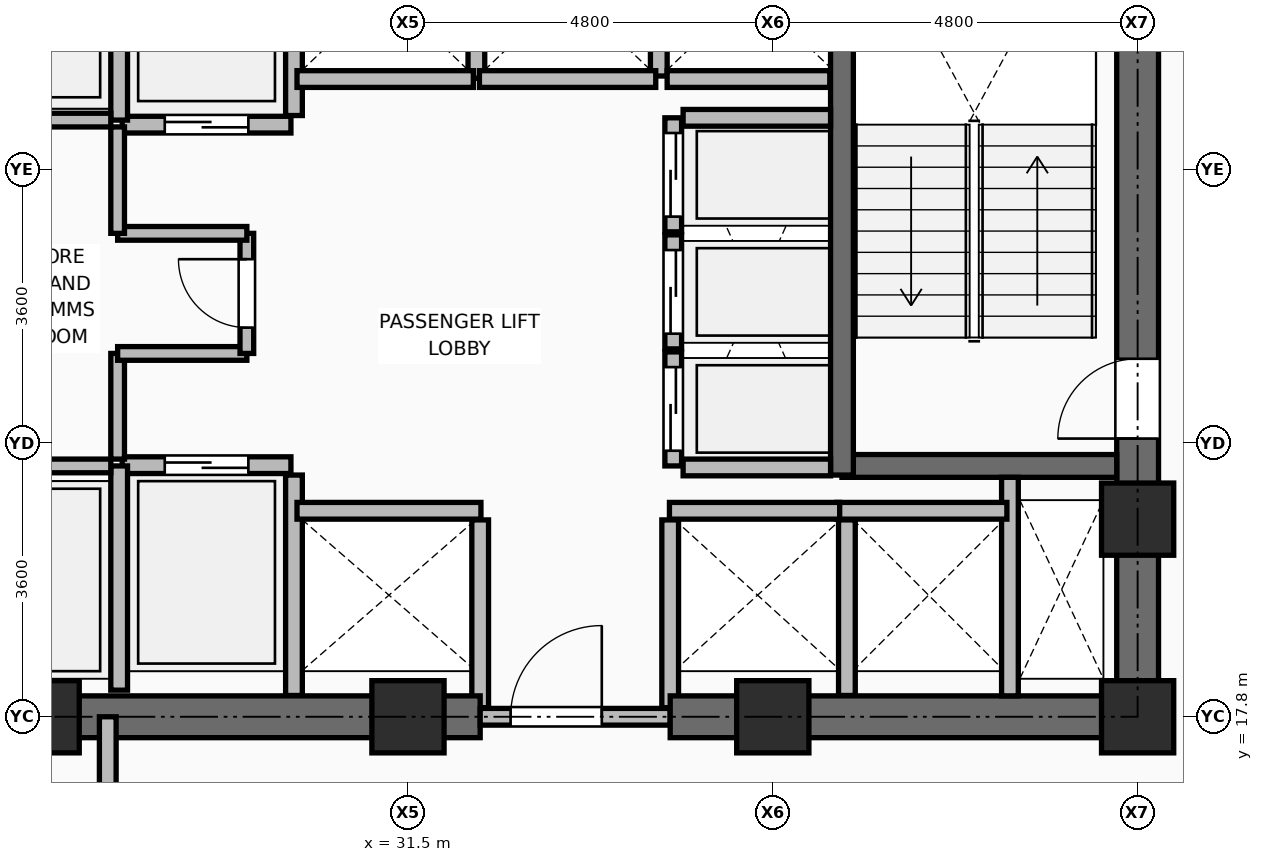
"""IFC4 building model, lengths in metres.
Left out: names, types, materials, properties, quantities, classifications, styles, units other than length and angle.
Written with IfcOpenShell. Run it as: python <this file> out.ifc"""

import sys

from ifc_helpers import new_model, si_unit, direction, frame, frame_2d, origin, origin_2d, place, context, subcontext, project, spatial, rectangle, extrude, element, fill, save


model = new_model("IFC4")
c1 = context("Model", 3, precision=1e-05, world=origin(), true_north=direction((0.0, 1.0)))
c2 = subcontext(c1, "Body", "Model", "MODEL_VIEW")
j1 = project(units=[si_unit("LENGTHUNIT", "METRE"), si_unit("PLANEANGLEUNIT", "RADIAN")], contexts=[c1])
p1 = place(None, origin())
s1 = spatial("IfcSite", under=j1, at=p1, CompositionType="ELEMENT")
p2 = place(p1, origin())
s2 = spatial("IfcBuilding", under=s1, at=p2, CompositionType="ELEMENT")
p3 = place(p2, frame((0.0, 0.0, 172.2)))
s3 = spatial("IfcBuildingStorey", under=s2, at=p3, CompositionType="ELEMENT", Elevation=172.2)
for number, where, z_axis, x_axis in (
    (1, (26.7, 17.8, 0.0), (0.0, 0.0, 1.0), (1.0, 0.0, 0.0)),
    (2, (31.5, 17.8, 0.0), (0.0, 0.0, 1.0), (1.0, 0.0, 0.0)),
    (3, (36.3, 17.8, 0.0), (0.0, 0.0, 1.0), (1.0, 0.0, 0.0)),
    (4, (41.1, 17.8, 0.0), (0.0, 0.0, 1.0), (1.0, 0.0, 0.0)),
    (5, (41.1, 20.4, 0.0), (0.0, 0.0, 1.0), (1.0, 0.0, 0.0)),
):
    element("IfcColumn", number, at=place(p3, frame(where, z_axis=z_axis, x_axis=x_axis)), inside=s3, PredefinedType="COLUMN", context=c2, shape_type="SweptSolid", body=[
        extrude(rectangle(XDim=0.95, YDim=0.95, at=origin_2d()), origin(), (0.0, 0.0, 1.0), 3.75),
    ])
p4 = place(p3, frame((30.0, 18.08, 0.0), z_axis=(0.0, 0.0, 1.0), x_axis=(0.0, 1.0, 0.0)))
e6 = element("IfcWall", 6, at=p4, inside=s3, PredefinedType="PARTITIONING", context=c2, shape_type="SweptSolid", body=[
    extrude(rectangle(XDim=2.9, YDim=0.22, at=frame_2d((1.45, 0.0))), origin(), (0.0, 0.0, 1.0), 3.475),
])
for number, where, z_axis, x_axis in (
    (7, (32.45, 17.92, 0.0), (0.0, 0.0, 1.0), (0.0, 1.0, 0.0)),
    (8, (34.95, 17.92, 0.0), (0.0, 0.0, 1.0), (0.0, 1.0, 0.0)),
):
    element("IfcWall", number, at=place(p3, frame(where, z_axis=z_axis, x_axis=x_axis)), inside=s3, PredefinedType="PARTITIONING", context=c2, shape_type="SweptSolid", body=[
        extrude(rectangle(XDim=2.47, YDim=0.22, at=frame_2d((1.235, 0.0))), origin(), (0.0, 0.0, 1.0), 2.936),
    ])
p5 = place(p3, frame((37.275, 18.08, 0.0), z_axis=(0.0, 0.0, 1.0), x_axis=(0.0, 1.0, 0.0)))
e9 = element("IfcWall", 9, at=p5, inside=s3, PredefinedType="PARTITIONING", context=c2, shape_type="SweptSolid", body=[
    extrude(rectangle(XDim=2.31, YDim=0.22, at=frame_2d((1.155, 0.0))), origin(), (0.0, 0.0, 1.0), 3.475),
])
p6 = place(p3, frame((30.0, 25.71, 0.0), z_axis=(0.0, 0.0, 1.0), x_axis=(0.0, 1.0, 0.0)))
e10 = element("IfcWall", 10, at=p6, inside=s3, PredefinedType="PARTITIONING", context=c2, shape_type="SweptSolid", body=[
    extrude(rectangle(XDim=2.73, YDim=0.22, at=frame_2d((1.365, 0.0))), origin(), (0.0, 0.0, 1.0), 3.475),
])
p7 = place(p3, frame((32.4, 26.2, 0.0), z_axis=(0.0, 0.0, 1.0), x_axis=(0.0, 1.0, 0.0)))
e11 = element("IfcWall", 11, at=p7, inside=s3, PredefinedType="PARTITIONING", context=c2, shape_type="SweptSolid", body=[
    extrude(rectangle(XDim=2.24, YDim=0.22, at=frame_2d((1.12, 0.0))), origin(), (0.0, 0.0, 1.0), 3.475),
])
p8 = place(p3, frame((34.8, 26.23, 0.0), z_axis=(0.0, 0.0, 1.0), x_axis=(0.0, 1.0, 0.0)))
e12 = element("IfcWall", 12, at=p8, inside=s3, PredefinedType="PARTITIONING", context=c2, shape_type="SweptSolid", body=[
    extrude(rectangle(XDim=2.21, YDim=0.22, at=frame_2d((1.105, 0.0))), origin(), (0.0, 0.0, 1.0), 3.475),
])
p9 = place(p3, frame((34.91, 26.19, 0.0), z_axis=(0.0, 0.0, 1.0), x_axis=(1.0, 0.0, 0.0)))
e13 = element("IfcWall", 13, at=p9, inside=s3, PredefinedType="PARTITIONING", context=c2, shape_type="SweptSolid", body=[
    extrude(rectangle(XDim=2.14, YDim=0.22, at=frame_2d((1.07, 0.0))), origin(), (0.0, 0.0, 1.0), 3.475),
])
p10 = place(p3, frame((25.55, 17.8, 0.0), z_axis=(0.0, 0.0, 1.0), x_axis=(1.0, 0.0, 0.0)))
e14 = element("IfcWall", 14, at=p10, inside=s3, PredefinedType="SHEAR", context=c2, shape_type="SweptSolid", body=[
    extrude(rectangle(XDim=6.9, YDim=0.55, at=frame_2d((3.45, 0.0))), origin(), (0.0, 0.0, 1.0), 3.5),
])
p11 = place(p3, frame((32.45, 17.8, 0.0), z_axis=(0.0, 0.0, 1.0), x_axis=(1.0, 0.0, 0.0)))
e15 = element("IfcWall", 15, at=p11, inside=s3, PredefinedType="PARTITIONING", context=c2, shape_type="SweptSolid", body=[
    extrude(rectangle(XDim=2.5, YDim=0.22, at=frame_2d((1.25, 0.0))), origin(), (0.0, 0.0, 1.0), 2.936),
])
p12 = place(p11, frame((0.4, 0.0, 0.0)))
e16 = element("IfcOpeningElement", 16, at=p12, cuts=e15, PredefinedType="OPENING", context=c2, shape_type="SweptSolid", body=[
    extrude(rectangle(XDim=1.2, YDim=2.1, at=frame_2d((0.6, 1.05))), frame((0.0, 0.12, 0.0), z_axis=(0.0, -1.0, 0.0), x_axis=(1.0, 0.0, 0.0)), (0.0, 0.0, 1.0), 0.24),
])
p13 = place(p3, frame((34.95, 17.8, 0.0), z_axis=(0.0, 0.0, 1.0), x_axis=(1.0, 0.0, 0.0)))
e17 = element("IfcWall", 17, at=p13, inside=s3, PredefinedType="SHEAR", context=c2, shape_type="SweptSolid", body=[
    extrude(rectangle(XDim=6.425, YDim=0.55, at=frame_2d((3.212, 0.0))), origin(), (0.0, 0.0, 1.0), 3.5),
])
p14 = place(p3, frame((41.1, 18.075, 0.0), z_axis=(0.0, 0.0, 1.0), x_axis=(0.0, 1.0, 0.0)))
e18 = element("IfcWall", 18, at=p14, inside=s3, PredefinedType="SHEAR", context=c2, shape_type="SweptSolid", body=[
    extrude(rectangle(XDim=14.1, YDim=0.55, at=frame_2d((7.05, 0.0))), origin(), (0.0, 0.0, 1.0), 3.5),
])
p15 = place(p14, frame((3.385, 0.0, 0.0)))
e19 = element("IfcOpeningElement", 19, at=p15, cuts=e18, PredefinedType="OPENING", context=c2, shape_type="SweptSolid", body=[
    extrude(rectangle(XDim=1.05, YDim=2.1, at=frame_2d((0.525, 1.05))), frame((0.0, 0.285, 0.0), z_axis=(0.0, -1.0, 0.0), x_axis=(1.0, 0.0, 0.0)), (0.0, 0.0, 1.0), 0.57),
])
p16 = place(p3, frame((37.21, 21.1, 0.0), z_axis=(0.0, 0.0, 1.0), x_axis=(1.0, 0.0, 0.0)))
e20 = element("IfcWall", 20, at=p16, inside=s3, PredefinedType="SHEAR", context=c2, shape_type="SweptSolid", body=[
    extrude(rectangle(XDim=3.615, YDim=0.3, at=frame_2d((1.808, 0.0))), origin(), (0.0, 0.0, 1.0), 3.5),
])
p17 = place(p3, frame((37.21, 20.98, 0.0), z_axis=(0.0, 0.0, 1.0), x_axis=(0.0, 1.0, 0.0)))
e21 = element("IfcWall", 21, at=p17, inside=s3, PredefinedType="SHEAR", context=c2, shape_type="SweptSolid", body=[
    extrude(rectangle(XDim=7.99, YDim=0.3, at=frame_2d((3.995, 0.0))), origin(), (0.0, 0.0, 1.0), 3.5),
])
p18 = place(p3, frame((39.42, 18.075, 0.0), z_axis=(0.0, 0.0, 1.0), x_axis=(0.0, 1.0, 0.0)))
e22 = element("IfcWall", 22, at=p18, inside=s3, PredefinedType="PARTITIONING", context=c2, shape_type="SweptSolid", body=[
    extrude(rectangle(XDim=2.875, YDim=0.22, at=frame_2d((1.438, 0.0))), origin(), (0.0, 0.0, 1.0), 3.48),
])
p19 = place(p3, frame((27.74, 21.11, 0.0), z_axis=(0.0, 0.0, 1.0), x_axis=(1.0, 0.0, 0.0)))
e23 = element("IfcWall", 23, at=p19, inside=s3, PredefinedType="PARTITIONING", context=c2, shape_type="SweptSolid", body=[
    extrude(rectangle(XDim=2.22, YDim=0.22, at=frame_2d((1.11, 0.0))), origin(), (0.0, 0.0, 1.0), 3.48),
])
p20 = place(p19, frame((0.56, 0.0, 0.0)))
e24 = element("IfcOpeningElement", 24, at=p20, cuts=e23, PredefinedType="OPENING", context=c2, shape_type="SweptSolid", body=[
    extrude(rectangle(XDim=1.1, YDim=2.2, at=frame_2d((0.55, 1.1))), frame((0.0, 0.12, 0.0), z_axis=(0.0, -1.0, 0.0), x_axis=(1.0, 0.0, 0.0)), (0.0, 0.0, 1.0), 0.24),
])
p21 = place(p3, frame((27.74, 25.59, 0.0), z_axis=(0.0, 0.0, 1.0), x_axis=(1.0, 0.0, 0.0)))
e25 = element("IfcWall", 25, at=p21, inside=s3, PredefinedType="PARTITIONING", context=c2, shape_type="SweptSolid", body=[
    extrude(rectangle(XDim=2.22, YDim=0.22, at=frame_2d((1.11, 0.0))), origin(), (0.0, 0.0, 1.0), 3.48),
])
p22 = place(p21, frame((0.56, 0.0, 0.0)))
e26 = element("IfcOpeningElement", 26, at=p22, cuts=e25, PredefinedType="OPENING", context=c2, shape_type="SweptSolid", body=[
    extrude(rectangle(XDim=1.1, YDim=2.2, at=frame_2d((0.55, 1.1))), frame((0.0, 0.12, 0.0), z_axis=(0.0, -1.0, 0.0), x_axis=(1.0, 0.0, 0.0)), (0.0, 0.0, 1.0), 0.24),
])
p23 = place(p3, frame((30.04, 20.51, 0.0), z_axis=(0.0, 0.0, 1.0), x_axis=(1.0, 0.0, 0.0)))
e27 = element("IfcWall", 27, at=p23, inside=s3, PredefinedType="PARTITIONING", context=c2, shape_type="SweptSolid", body=[
    extrude(rectangle(XDim=2.42, YDim=0.22, at=frame_2d((1.21, 0.0))), origin(), (0.0, 0.0, 1.0), 3.48),
])
for number, where, z_axis, x_axis in (
    (28, (37.14, 20.51, 0.0), (0.0, 0.0, 1.0), (1.0, 0.0, 0.0)),
    (29, (34.94, 20.51, 0.0), (0.0, 0.0, 1.0), (1.0, 0.0, 0.0)),
):
    element("IfcWall", number, at=place(p3, frame(where, z_axis=z_axis, x_axis=x_axis)), inside=s3, PredefinedType="PARTITIONING", context=c2, shape_type="SweptSolid", body=[
        extrude(rectangle(XDim=2.24, YDim=0.22, at=frame_2d((1.12, 0.0))), origin(), (0.0, 0.0, 1.0), 3.48),
    ])
for number, where, z_axis, x_axis in (
    (30, (30.04, 26.19, 0.0), (0.0, 0.0, 1.0), (1.0, 0.0, 0.0)),
    (31, (32.44, 26.19, 0.0), (0.0, 0.0, 1.0), (1.0, 0.0, 0.0)),
):
    element("IfcWall", number, at=place(p3, frame(where, z_axis=z_axis, x_axis=x_axis)), inside=s3, PredefinedType="PARTITIONING", context=c2, shape_type="SweptSolid", body=[
        extrude(rectangle(XDim=2.32, YDim=0.22, at=frame_2d((1.16, 0.0))), origin(), (0.0, 0.0, 1.0), 3.48),
    ])
p24 = place(p3, frame((34.99, 21.1, 0.0), z_axis=(0.0, 0.0, 1.0), x_axis=(0.0, 1.0, 0.0)))
e32 = element("IfcWall", 32, at=p24, inside=s3, PredefinedType="PARTITIONING", context=c2, shape_type="SweptSolid", body=[
    extrude(rectangle(XDim=1.5, YDim=0.22, at=frame_2d((0.75, 0.0))), origin(), (0.0, 0.0, 1.0), 3.48),
])
p25 = place(p24, frame((0.2, 0.0, 0.0)))
e33 = element("IfcOpeningElement", 33, at=p25, cuts=e32, PredefinedType="OPENING", context=c2, shape_type="SweptSolid", body=[
    extrude(rectangle(XDim=1.1, YDim=2.2, at=frame_2d((0.55, 1.1))), frame((0.0, 0.12, 0.0), z_axis=(0.0, -1.0, 0.0), x_axis=(1.0, 0.0, 0.0)), (0.0, 0.0, 1.0), 0.24),
])
p26 = place(p3, frame((34.99, 22.64, 0.0), z_axis=(0.0, 0.0, 1.0), x_axis=(0.0, 1.0, 0.0)))
e34 = element("IfcWall", 34, at=p26, inside=s3, PredefinedType="PARTITIONING", context=c2, shape_type="SweptSolid", body=[
    extrude(rectangle(XDim=1.5, YDim=0.22, at=frame_2d((0.75, 0.0))), origin(), (0.0, 0.0, 1.0), 3.48),
])
p27 = place(p26, frame((0.2, 0.0, 0.0)))
e35 = element("IfcOpeningElement", 35, at=p27, cuts=e34, PredefinedType="OPENING", context=c2, shape_type="SweptSolid", body=[
    extrude(rectangle(XDim=1.1, YDim=2.2, at=frame_2d((0.55, 1.1))), frame((0.0, 0.12, 0.0), z_axis=(0.0, -1.0, 0.0), x_axis=(1.0, 0.0, 0.0)), (0.0, 0.0, 1.0), 0.24),
])
p28 = place(p3, frame((34.99, 24.18, 0.0), z_axis=(0.0, 0.0, 1.0), x_axis=(0.0, 1.0, 0.0)))
e36 = element("IfcWall", 36, at=p28, inside=s3, PredefinedType="PARTITIONING", context=c2, shape_type="SweptSolid", body=[
    extrude(rectangle(XDim=1.5, YDim=0.22, at=frame_2d((0.75, 0.0))), origin(), (0.0, 0.0, 1.0), 3.48),
])
p29 = place(p28, frame((0.2, 0.0, 0.0)))
e37 = element("IfcOpeningElement", 37, at=p29, cuts=e36, PredefinedType="OPENING", context=c2, shape_type="SweptSolid", body=[
    extrude(rectangle(XDim=1.1, YDim=2.2, at=frame_2d((0.55, 1.1))), frame((0.0, 0.12, 0.0), z_axis=(0.0, -1.0, 0.0), x_axis=(1.0, 0.0, 0.0)), (0.0, 0.0, 1.0), 0.24),
])
p30 = place(p3, frame((27.7, 18.15, 0.0), z_axis=(0.0, 0.0, 1.0), x_axis=(0.0, 1.0, 0.0)))
e38 = element("IfcWall", 38, at=p30, inside=s3, PredefinedType="PARTITIONING", context=c2, shape_type="SweptSolid", body=[
    extrude(rectangle(XDim=2.95, YDim=0.22, at=frame_2d((1.475, 0.0))), origin(), (0.0, 0.0, 1.0), 3.48),
])
p31 = place(p3, frame((27.7, 25.65, 0.0), z_axis=(0.0, 0.0, 1.0), x_axis=(0.0, 1.0, 0.0)))
e39 = element("IfcWall", 39, at=p31, inside=s3, PredefinedType="PARTITIONING", context=c2, shape_type="SweptSolid", body=[
    extrude(rectangle(XDim=3.0, YDim=0.22, at=frame_2d((1.5, 0.0))), origin(), (0.0, 0.0, 1.0), 3.48),
])
for number, where, z_axis, x_axis in (
    (40, (35.12, 21.08, 0.0), (0.0, 0.0, 1.0), (1.0, 0.0, 0.0)),
    (41, (35.12, 25.68, 0.0), (0.0, 0.0, 1.0), (1.0, 0.0, 0.0)),
):
    element("IfcWall", number, at=place(p3, frame(where, z_axis=z_axis, x_axis=x_axis)), inside=s3, PredefinedType="PARTITIONING", context=c2, shape_type="SweptSolid", body=[
        extrude(rectangle(XDim=1.94, YDim=0.22, at=frame_2d((0.97, 0.0))), origin(), (0.0, 0.0, 1.0), 3.48),
    ])
for number, where, z_axis, x_axis in (
    (42, (25.89, 21.1, 0.0), (0.0, 0.0, 1.0), (1.0, 0.0, 0.0)),
    (43, (25.89, 25.65, 0.0), (0.0, 0.0, 1.0), (1.0, 0.0, 0.0)),
):
    element("IfcWall", number, at=place(p3, frame(where, z_axis=z_axis, x_axis=x_axis)), inside=s3, PredefinedType="PARTITIONING", context=c2, shape_type="SweptSolid", body=[
        extrude(rectangle(XDim=1.7, YDim=0.18, at=frame_2d((0.85, 0.0))), origin(), (0.0, 0.0, 1.0), 3.48),
    ])
p32 = place(p3, frame((27.68, 21.19, 0.0), z_axis=(0.0, 0.0, 1.0), x_axis=(0.0, 1.0, 0.0)))
e44 = element("IfcWall", 44, at=p32, inside=s3, PredefinedType="PARTITIONING", context=c2, shape_type="SweptSolid", body=[
    extrude(rectangle(XDim=1.39, YDim=0.18, at=frame_2d((0.695, 0.0))), origin(), (0.0, 0.0, 1.0), 3.48),
])
p33 = place(p3, frame((27.68, 22.58, 0.0), z_axis=(0.0, 0.0, 1.0), x_axis=(1.0, 0.0, 0.0)))
e45 = element("IfcWall", 45, at=p33, inside=s3, PredefinedType="PARTITIONING", context=c2, shape_type="SweptSolid", body=[
    extrude(rectangle(XDim=1.7, YDim=0.18, at=frame_2d((0.85, 0.0))), origin(), (0.0, 0.0, 1.0), 3.48),
])
p34 = place(p3, frame((29.38, 22.58, 0.0), z_axis=(0.0, 0.0, 1.0), x_axis=(0.0, 1.0, 0.0)))
e46 = element("IfcWall", 46, at=p34, inside=s3, PredefinedType="PARTITIONING", context=c2, shape_type="SweptSolid", body=[
    extrude(rectangle(XDim=1.58, YDim=0.18, at=frame_2d((0.79, 0.0))), origin(), (0.0, 0.0, 1.0), 3.48),
])
p35 = place(p34, frame((0.34, 0.0, 0.0)))
e47 = element("IfcOpeningElement", 47, at=p35, cuts=e46, PredefinedType="OPENING", context=c2, shape_type="SweptSolid", body=[
    extrude(rectangle(XDim=0.9, YDim=2.1, at=frame_2d((0.45, 1.05))), frame((0.0, 0.1, 0.0), z_axis=(0.0, -1.0, 0.0), x_axis=(1.0, 0.0, 0.0)), (0.0, 0.0, 1.0), 0.2),
])
p36 = place(p3, frame((27.68, 24.16, 0.0), z_axis=(0.0, 0.0, 1.0), x_axis=(1.0, 0.0, 0.0)))
e48 = element("IfcWall", 48, at=p36, inside=s3, PredefinedType="PARTITIONING", context=c2, shape_type="SweptSolid", body=[
    extrude(rectangle(XDim=1.7, YDim=0.18, at=frame_2d((0.85, 0.0))), origin(), (0.0, 0.0, 1.0), 3.48),
])
p37 = place(p3, frame((27.68, 24.16, 0.0), z_axis=(0.0, 0.0, 1.0), x_axis=(0.0, 1.0, 0.0)))
e49 = element("IfcWall", 49, at=p37, inside=s3, PredefinedType="PARTITIONING", context=c2, shape_type="SweptSolid", body=[
    extrude(rectangle(XDim=1.4, YDim=0.18, at=frame_2d((0.7, 0.0))), origin(), (0.0, 0.0, 1.0), 3.48),
])
p38 = place(p3, frame((27.55, 14.35, 0.0), z_axis=(0.0, 0.0, 1.0), x_axis=(0.0, 1.0, 0.0)))
e50 = element("IfcWall", 50, at=p38, inside=s3, PredefinedType="PARTITIONING", context=c2, shape_type="SweptSolid", body=[
    extrude(rectangle(XDim=3.45, YDim=0.22, at=frame_2d((1.725, 0.0))), origin(), (0.0, 0.0, 1.0), 2.936),
])
p39 = place(p38, frame((1.175, 0.0, 0.0)))
e51 = element("IfcOpeningElement", 51, at=p39, cuts=e50, PredefinedType="OPENING", context=c2, shape_type="SweptSolid", body=[
    extrude(rectangle(XDim=1.1, YDim=2.1, at=frame_2d((0.55, 1.05))), frame((0.0, 0.12, 0.0), z_axis=(0.0, -1.0, 0.0), x_axis=(1.0, 0.0, 0.0)), (0.0, 0.0, 1.0), 0.24),
])
p40 = place(p12, origin())
e52 = element("IfcDoor", 52, at=p40, inside=s3, OperationType="SINGLE_SWING_RIGHT", PredefinedType="DOOR", context=c2, shape_type="SweptSolid", body=[
    extrude(rectangle(XDim=1.2, YDim=2.1, at=frame_2d((0.6, 1.05))), frame((0.0, 0.025, 0.0), z_axis=(0.0, -1.0, 0.0), x_axis=(1.0, 0.0, 0.0)), (0.0, 0.0, 1.0), 0.05),
])
fill(e16, e52)
p41 = place(p15, origin())
e53 = element("IfcDoor", 53, at=p41, inside=s3, OperationType="SINGLE_SWING_LEFT", PredefinedType="DOOR", context=c2, shape_type="SweptSolid", body=[
    extrude(rectangle(XDim=1.05, YDim=2.1, at=frame_2d((0.525, 1.05))), frame((0.0, 0.025, 0.0), z_axis=(0.0, -1.0, 0.0), x_axis=(1.0, 0.0, 0.0)), (0.0, 0.0, 1.0), 0.05),
])
fill(e19, e53)
p42 = place(p20, origin())
e54 = element("IfcDoor", 54, at=p42, inside=s3, OperationType="DOUBLE_DOOR_SLIDING", PredefinedType="DOOR", context=c2, shape_type="SweptSolid", body=[
    extrude(rectangle(XDim=1.1, YDim=2.2, at=frame_2d((0.55, 1.1))), frame((0.0, 0.025, 0.0), z_axis=(0.0, -1.0, 0.0), x_axis=(1.0, 0.0, 0.0)), (0.0, 0.0, 1.0), 0.05),
])
fill(e24, e54)
p43 = place(p22, frame((1.1, 0.0, 0.0), z_axis=(0.0, 0.0, 1.0), x_axis=(-1.0, 0.0, 0.0)))
e55 = element("IfcDoor", 55, at=p43, inside=s3, OperationType="DOUBLE_DOOR_SLIDING", PredefinedType="DOOR", context=c2, shape_type="SweptSolid", body=[
    extrude(rectangle(XDim=1.1, YDim=2.2, at=frame_2d((0.55, 1.1))), frame((0.0, 0.025, 0.0), z_axis=(0.0, -1.0, 0.0), x_axis=(1.0, 0.0, 0.0)), (0.0, 0.0, 1.0), 0.05),
])
fill(e26, e55)
p44 = place(p25, origin())
e56 = element("IfcDoor", 56, at=p44, inside=s3, OperationType="DOUBLE_DOOR_SLIDING", PredefinedType="DOOR", context=c2, shape_type="SweptSolid", body=[
    extrude(rectangle(XDim=1.1, YDim=2.2, at=frame_2d((0.55, 1.1))), frame((0.0, 0.025, 0.0), z_axis=(0.0, -1.0, 0.0), x_axis=(1.0, 0.0, 0.0)), (0.0, 0.0, 1.0), 0.05),
])
fill(e33, e56)
p45 = place(p27, origin())
e57 = element("IfcDoor", 57, at=p45, inside=s3, OperationType="DOUBLE_DOOR_SLIDING", PredefinedType="DOOR", context=c2, shape_type="SweptSolid", body=[
    extrude(rectangle(XDim=1.1, YDim=2.2, at=frame_2d((0.55, 1.1))), frame((0.0, 0.025, 0.0), z_axis=(0.0, -1.0, 0.0), x_axis=(1.0, 0.0, 0.0)), (0.0, 0.0, 1.0), 0.05),
])
fill(e35, e57)
p46 = place(p29, origin())
e58 = element("IfcDoor", 58, at=p46, inside=s3, OperationType="DOUBLE_DOOR_SLIDING", PredefinedType="DOOR", context=c2, shape_type="SweptSolid", body=[
    extrude(rectangle(XDim=1.1, YDim=2.2, at=frame_2d((0.55, 1.1))), frame((0.0, 0.025, 0.0), z_axis=(0.0, -1.0, 0.0), x_axis=(1.0, 0.0, 0.0)), (0.0, 0.0, 1.0), 0.05),
])
fill(e37, e58)
p47 = place(p35, origin())
e59 = element("IfcDoor", 59, at=p47, inside=s3, OperationType="SINGLE_SWING_RIGHT", PredefinedType="DOOR", context=c2, shape_type="SweptSolid", body=[
    extrude(rectangle(XDim=0.9, YDim=2.1, at=frame_2d((0.45, 1.05))), frame((0.0, 0.025, 0.0), z_axis=(0.0, -1.0, 0.0), x_axis=(1.0, 0.0, 0.0)), (0.0, 0.0, 1.0), 0.05),
])
fill(e47, e59)
save(model, sys.argv[1])
